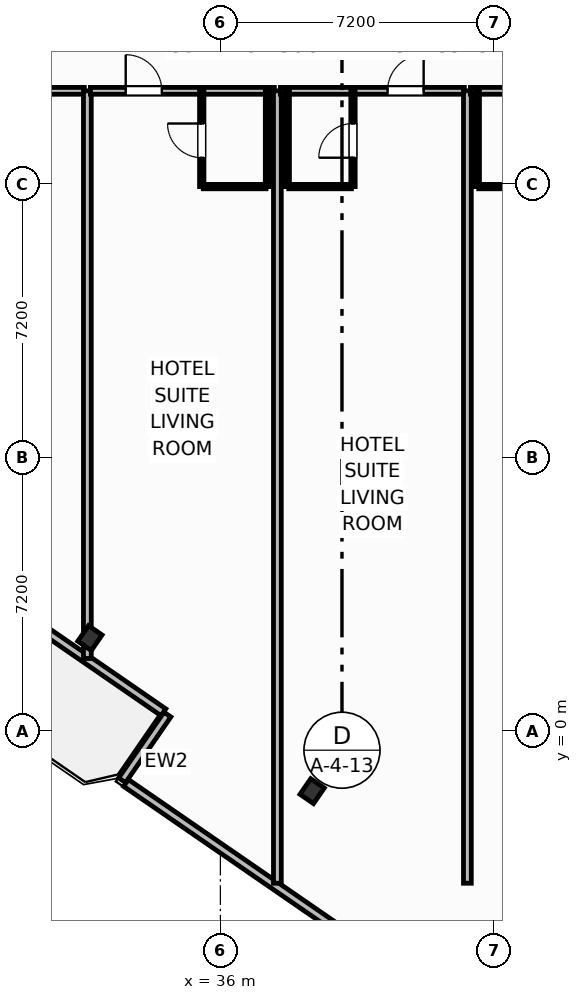
"""IFC4 building model, lengths in metres.
Left out: names, types, materials, properties, quantities, classifications, styles, units other than length and angle.
Written with IfcOpenShell. Run it as: python <this file> out.ifc"""

import sys

from ifc_helpers import new_model, si_unit, direction, frame, frame_2d, origin, origin_2d, place, context, subcontext, project, spatial, rectangle, i_section, extrude, element, fill, save


model = new_model("IFC4")
c1 = context("Model", 3, precision=1e-05, world=origin(), true_north=direction((0.0, 1.0)))
c2 = subcontext(c1, "Body", "Model", "MODEL_VIEW")
j1 = project(units=[si_unit("LENGTHUNIT", "METRE"), si_unit("PLANEANGLEUNIT", "RADIAN")], contexts=[c1])
p1 = place(None, origin())
s1 = spatial("IfcSite", under=j1, at=p1, CompositionType="ELEMENT")
p2 = place(p1, origin())
s2 = spatial("IfcBuilding", under=s1, at=p2, CompositionType="ELEMENT")
p3 = place(p2, frame((0.0, 0.0, 34.4)))
s3 = spatial("IfcBuildingStorey", under=s2, at=p3, CompositionType="ELEMENT", Elevation=34.4)
for number, where, z_axis, x_axis in (
    (1, (32.568, 2.45, 0.0), (0.0, 0.0, 1.0), (0.824, -0.567, 0.0)),
    (2, (38.415, -1.577, 0.0), (0.0, 0.0, 1.0), (0.824, -0.567, 0.0)),
):
    element("IfcColumn", number, at=place(p3, frame(where, z_axis=z_axis, x_axis=x_axis)), inside=s3, PredefinedType="COLUMN", context=c2, shape_type="SweptSolid", body=[
        extrude(i_section(OverallWidth=0.432, OverallDepth=0.498, WebThickness=0.056, FlangeThickness=0.089, FilletRadius=0.025, at=origin_2d()), origin(), (0.0, 0.0, 1.0), 3.7),
    ])
p4 = place(p3, frame((34.502, 0.499, 0.0), z_axis=(0.0, 0.0, 1.0), x_axis=(-0.823534636215, 0.567265989598, 0.0)))
e3 = element("IfcWall", 3, at=p4, inside=s3, PredefinedType="SOLIDWALL", context=c2, shape_type="SweptSolid", body=[
    extrude(rectangle(XDim=6.0, YDim=0.22, at=frame_2d((3.0, 0.0))), origin(), (0.0, 0.0, 1.0), 2.73),
])
p5 = place(p4, frame((4.1, 0.0, 0.0)))
e4 = element("IfcOpeningElement", 4, at=p5, cuts=e3, PredefinedType="OPENING", context=c2, shape_type="SweptSolid", body=[
    extrude(rectangle(XDim=1.5, YDim=2.25, at=frame_2d((0.75, 1.125))), frame((0.0, 0.12, 0.0), z_axis=(0.0, -1.0, 0.0), x_axis=(1.0, 0.0, 0.0)), (0.0, 0.0, 1.0), 0.24),
])
p6 = place(p3, frame((34.606, 0.439, 0.0), z_axis=(0.0, 0.0, 1.0), x_axis=(-0.567219383419, -0.823566737474, 0.0)))
e5 = element("IfcWall", 5, at=p6, inside=s3, PredefinedType="SOLIDWALL", context=c2, shape_type="SweptSolid", body=[
    extrude(rectangle(XDim=2.1, YDim=0.22, at=frame_2d((1.05, 0.0))), origin(), (0.0, 0.0, 1.0), 2.73),
])
p7 = place(p3, frame((33.518, -1.362, 0.0), z_axis=(0.0, 0.0, 1.0), x_axis=(0.82353935489, -0.567259139148, 0.0)))
e6 = element("IfcWall", 6, at=p7, inside=s3, PredefinedType="SOLIDWALL", context=c2, shape_type="SweptSolid", body=[
    extrude(rectangle(XDim=23.147, YDim=0.22, at=frame_2d((11.573, 0.0))), origin(), (0.0, 0.0, 1.0), 2.73),
])
p8 = place(p7, frame((10.749, 0.0, 0.8)))
e7 = element("IfcOpeningElement", 7, at=p8, cuts=e6, PredefinedType="OPENING", context=c2, shape_type="SweptSolid", body=[
    extrude(rectangle(XDim=1.65, YDim=1.65, at=frame_2d((0.825, 0.825))), frame((0.0, 0.12, 0.0), z_axis=(0.0, -1.0, 0.0), x_axis=(1.0, 0.0, 0.0)), (0.0, 0.0, 1.0), 0.24),
])
p9 = place(p3, frame((27.58, 16.85, 0.0), z_axis=(0.0, 0.0, 1.0), x_axis=(1.0, 0.0, 0.0)))
e8 = element("IfcWall", 8, at=p9, inside=s3, PredefinedType="PARTITIONING", context=c2, shape_type="SweptSolid", body=[
    extrude(rectangle(XDim=4.84, YDim=0.18, at=frame_2d((2.42, 0.0))), origin(), (0.0, 0.0, 1.0), 3.45),
])
p10 = place(p9, frame((2.819, 0.0, 0.0)))
e9 = element("IfcOpeningElement", 9, at=p10, cuts=e8, PredefinedType="OPENING", context=c2, shape_type="SweptSolid", body=[
    extrude(rectangle(XDim=0.95, YDim=2.15, at=frame_2d((0.475, 1.075))), frame((0.0, 0.1, 0.0), z_axis=(0.0, -1.0, 0.0), x_axis=(1.0, 0.0, 0.0)), (0.0, 0.0, 1.0), 0.2),
])
p11 = place(p3, frame((32.5, 1.914, 0.0), z_axis=(0.0, 0.0, 1.0), x_axis=(0.0, 1.0, 0.0)))
e10 = element("IfcWall", 10, at=p11, inside=s3, PredefinedType="PARTITIONING", context=c2, shape_type="SweptSolid", body=[
    extrude(rectangle(XDim=14.936, YDim=0.205, at=frame_2d((7.468, 0.0))), origin(), (0.0, 0.0, 1.0), 2.58),
])
p12 = place(p3, frame((32.58, 16.85, 0.0), z_axis=(0.0, 0.0, 1.0), x_axis=(1.0, 0.0, 0.0)))
e11 = element("IfcWall", 11, at=p12, inside=s3, PredefinedType="PARTITIONING", context=c2, shape_type="SweptSolid", body=[
    extrude(rectangle(XDim=4.84, YDim=0.18, at=frame_2d((2.42, 0.0))), origin(), (0.0, 0.0, 1.0), 3.45),
])
p13 = place(p12, frame((0.929, 0.0, 0.0)))
e12 = element("IfcOpeningElement", 12, at=p13, cuts=e11, PredefinedType="OPENING", context=c2, shape_type="SweptSolid", body=[
    extrude(rectangle(XDim=0.95, YDim=2.15, at=frame_2d((0.475, 1.075))), frame((0.0, 0.1, 0.0), z_axis=(0.0, -1.0, 0.0), x_axis=(1.0, 0.0, 0.0)), (0.0, 0.0, 1.0), 0.2),
])
p14 = place(p3, frame((35.55, 14.33, 0.0), z_axis=(0.0, 0.0, 1.0), x_axis=(1.0, 0.0, 0.0)))
e13 = element("IfcWall", 13, at=p14, inside=s3, PredefinedType="PARTITIONING", context=c2, shape_type="SweptSolid", body=[
    extrude(rectangle(XDim=1.65, YDim=0.115, at=frame_2d((0.825, 0.0))), origin(), (0.0, 0.0, 1.0), 3.45),
])
p15 = place(p3, frame((35.51, 14.33, 0.0), z_axis=(0.0, 0.0, 1.0), x_axis=(0.0, 1.0, 0.0)))
e14 = element("IfcWall", 14, at=p15, inside=s3, PredefinedType="PARTITIONING", context=c2, shape_type="SweptSolid", body=[
    extrude(rectangle(XDim=2.52, YDim=0.115, at=frame_2d((1.26, 0.0))), origin(), (0.0, 0.0, 1.0), 3.45),
])
p16 = place(p15, frame((0.76, 0.0, 0.0)))
e15 = element("IfcOpeningElement", 15, at=p16, cuts=e14, PredefinedType="OPENING", context=c2, shape_type="SweptSolid", body=[
    extrude(rectangle(XDim=0.9, YDim=2.05, at=frame_2d((0.45, 1.025))), frame((0.0, 0.067, 0.0), z_axis=(0.0, -1.0, 0.0), x_axis=(1.0, 0.0, 0.0)), (0.0, 0.0, 1.0), 0.135),
])
p17 = place(p3, frame((37.24, 14.33, 0.0), z_axis=(0.0, 0.0, 1.0), x_axis=(0.0, 1.0, 0.0)))
e16 = element("IfcWall", 16, at=p17, inside=s3, PredefinedType="PARTITIONING", context=c2, shape_type="SweptSolid", body=[
    extrude(rectangle(XDim=2.52, YDim=0.115, at=frame_2d((1.26, 0.0))), origin(), (0.0, 0.0, 1.0), 3.45),
])
p18 = place(p3, frame((37.5, -4.0, 0.0), z_axis=(0.0, 0.0, 1.0), x_axis=(0.0, 1.0, 0.0)))
e17 = element("IfcWall", 17, at=p18, inside=s3, PredefinedType="PARTITIONING", context=c2, shape_type="SweptSolid", body=[
    extrude(rectangle(XDim=20.85, YDim=0.205, at=frame_2d((10.425, 0.0))), origin(), (0.0, 0.0, 1.0), 3.45),
])
p19 = place(p3, frame((37.58, 16.85, 0.0), z_axis=(0.0, 0.0, 1.0), x_axis=(1.0, 0.0, 0.0)))
e18 = element("IfcWall", 18, at=p19, inside=s3, PredefinedType="PARTITIONING", context=c2, shape_type="SweptSolid", body=[
    extrude(rectangle(XDim=4.84, YDim=0.18, at=frame_2d((2.42, 0.0))), origin(), (0.0, 0.0, 1.0), 3.45),
])
p20 = place(p19, frame((2.819, 0.0, 0.0)))
e19 = element("IfcOpeningElement", 19, at=p20, cuts=e18, PredefinedType="OPENING", context=c2, shape_type="SweptSolid", body=[
    extrude(rectangle(XDim=0.95, YDim=2.15, at=frame_2d((0.475, 1.075))), frame((0.0, 0.1, 0.0), z_axis=(0.0, -1.0, 0.0), x_axis=(1.0, 0.0, 0.0)), (0.0, 0.0, 1.0), 0.2),
])
p21 = place(p3, frame((37.8, 14.33, 0.0), z_axis=(0.0, 0.0, 1.0), x_axis=(1.0, 0.0, 0.0)))
e20 = element("IfcWall", 20, at=p21, inside=s3, PredefinedType="PARTITIONING", context=c2, shape_type="SweptSolid", body=[
    extrude(rectangle(XDim=1.65, YDim=0.115, at=frame_2d((0.825, 0.0))), origin(), (0.0, 0.0, 1.0), 3.45),
])
p22 = place(p3, frame((39.49, 14.33, 0.0), z_axis=(0.0, 0.0, 1.0), x_axis=(0.0, 1.0, 0.0)))
e21 = element("IfcWall", 21, at=p22, inside=s3, PredefinedType="PARTITIONING", context=c2, shape_type="SweptSolid", body=[
    extrude(rectangle(XDim=2.52, YDim=0.115, at=frame_2d((1.26, 0.0))), origin(), (0.0, 0.0, 1.0), 3.45),
])
p23 = place(p22, frame((0.76, 0.0, 0.0)))
e22 = element("IfcOpeningElement", 22, at=p23, cuts=e21, PredefinedType="OPENING", context=c2, shape_type="SweptSolid", body=[
    extrude(rectangle(XDim=0.9, YDim=2.05, at=frame_2d((0.45, 1.025))), frame((0.0, 0.067, 0.0), z_axis=(0.0, -1.0, 0.0), x_axis=(1.0, 0.0, 0.0)), (0.0, 0.0, 1.0), 0.135),
])
p24 = place(p3, frame((37.76, 14.33, 0.0), z_axis=(0.0, 0.0, 1.0), x_axis=(0.0, 1.0, 0.0)))
e23 = element("IfcWall", 23, at=p24, inside=s3, PredefinedType="PARTITIONING", context=c2, shape_type="SweptSolid", body=[
    extrude(rectangle(XDim=2.52, YDim=0.115, at=frame_2d((1.26, 0.0))), origin(), (0.0, 0.0, 1.0), 3.45),
])
p25 = place(p3, frame((42.5, -4.0, 0.0), z_axis=(0.0, 0.0, 1.0), x_axis=(0.0, 1.0, 0.0)))
e24 = element("IfcWall", 24, at=p25, inside=s3, PredefinedType="PARTITIONING", context=c2, shape_type="SweptSolid", body=[
    extrude(rectangle(XDim=20.85, YDim=0.205, at=frame_2d((10.425, 0.0))), origin(), (0.0, 0.0, 1.0), 2.58),
])
p26 = place(p3, frame((42.58, 16.85, 0.0), z_axis=(0.0, 0.0, 1.0), x_axis=(1.0, 0.0, 0.0)))
e25 = element("IfcWall", 25, at=p26, inside=s3, PredefinedType="PARTITIONING", context=c2, shape_type="SweptSolid", body=[
    extrude(rectangle(XDim=4.84, YDim=0.18, at=frame_2d((2.42, 0.0))), origin(), (0.0, 0.0, 1.0), 3.45),
])
p27 = place(p26, frame((2.819, 0.0, 0.0)))
e26 = element("IfcOpeningElement", 26, at=p27, cuts=e25, PredefinedType="OPENING", context=c2, shape_type="SweptSolid", body=[
    extrude(rectangle(XDim=0.95, YDim=2.15, at=frame_2d((0.475, 1.075))), frame((0.0, 0.1, 0.0), z_axis=(0.0, -1.0, 0.0), x_axis=(1.0, 0.0, 0.0)), (0.0, 0.0, 1.0), 0.2),
])
p28 = place(p3, frame((42.8, 14.33, 0.0), z_axis=(0.0, 0.0, 1.0), x_axis=(1.0, 0.0, 0.0)))
e27 = element("IfcWall", 27, at=p28, inside=s3, PredefinedType="PARTITIONING", context=c2, shape_type="SweptSolid", body=[
    extrude(rectangle(XDim=1.65, YDim=0.115, at=frame_2d((0.825, 0.0))), origin(), (0.0, 0.0, 1.0), 3.45),
])
p29 = place(p3, frame((42.76, 14.33, 0.0), z_axis=(0.0, 0.0, 1.0), x_axis=(0.0, 1.0, 0.0)))
e28 = element("IfcWall", 28, at=p29, inside=s3, PredefinedType="PARTITIONING", context=c2, shape_type="SweptSolid", body=[
    extrude(rectangle(XDim=2.52, YDim=0.115, at=frame_2d((1.26, 0.0))), origin(), (0.0, 0.0, 1.0), 3.45),
])
p30 = place(p13, origin())
e29 = element("IfcDoor", 29, at=p30, inside=s3, OperationType="SINGLE_SWING_LEFT", PredefinedType="DOOR", context=c2, shape_type="SweptSolid", body=[
    extrude(rectangle(XDim=0.95, YDim=2.15, at=frame_2d((0.475, 1.075))), frame((0.0, 0.025, 0.0), z_axis=(0.0, -1.0, 0.0), x_axis=(1.0, 0.0, 0.0)), (0.0, 0.0, 1.0), 0.05),
])
fill(e12, e29)
p31 = place(p16, origin())
e30 = element("IfcDoor", 30, at=p31, inside=s3, OperationType="SINGLE_SWING_RIGHT", PredefinedType="DOOR", context=c2, shape_type="SweptSolid", body=[
    extrude(rectangle(XDim=0.9, YDim=2.05, at=frame_2d((0.45, 1.025))), frame((0.0, 0.025, 0.0), z_axis=(0.0, -1.0, 0.0), x_axis=(1.0, 0.0, 0.0)), (0.0, 0.0, 1.0), 0.05),
])
fill(e15, e30)
p32 = place(p20, origin())
e31 = element("IfcDoor", 31, at=p32, inside=s3, OperationType="SINGLE_SWING_RIGHT", PredefinedType="DOOR", context=c2, shape_type="SweptSolid", body=[
    extrude(rectangle(XDim=0.95, YDim=2.15, at=frame_2d((0.475, 1.075))), frame((0.0, 0.025, 0.0), z_axis=(0.0, -1.0, 0.0), x_axis=(1.0, 0.0, 0.0)), (0.0, 0.0, 1.0), 0.05),
])
fill(e19, e31)
p33 = place(p23, origin())
e32 = element("IfcDoor", 32, at=p33, inside=s3, OperationType="SINGLE_SWING_LEFT", PredefinedType="DOOR", context=c2, shape_type="SweptSolid", body=[
    extrude(rectangle(XDim=0.9, YDim=2.05, at=frame_2d((0.45, 1.025))), frame((0.0, 0.025, 0.0), z_axis=(0.0, -1.0, 0.0), x_axis=(1.0, 0.0, 0.0)), (0.0, 0.0, 1.0), 0.05),
])
fill(e22, e32)
save(model, sys.argv[1])
